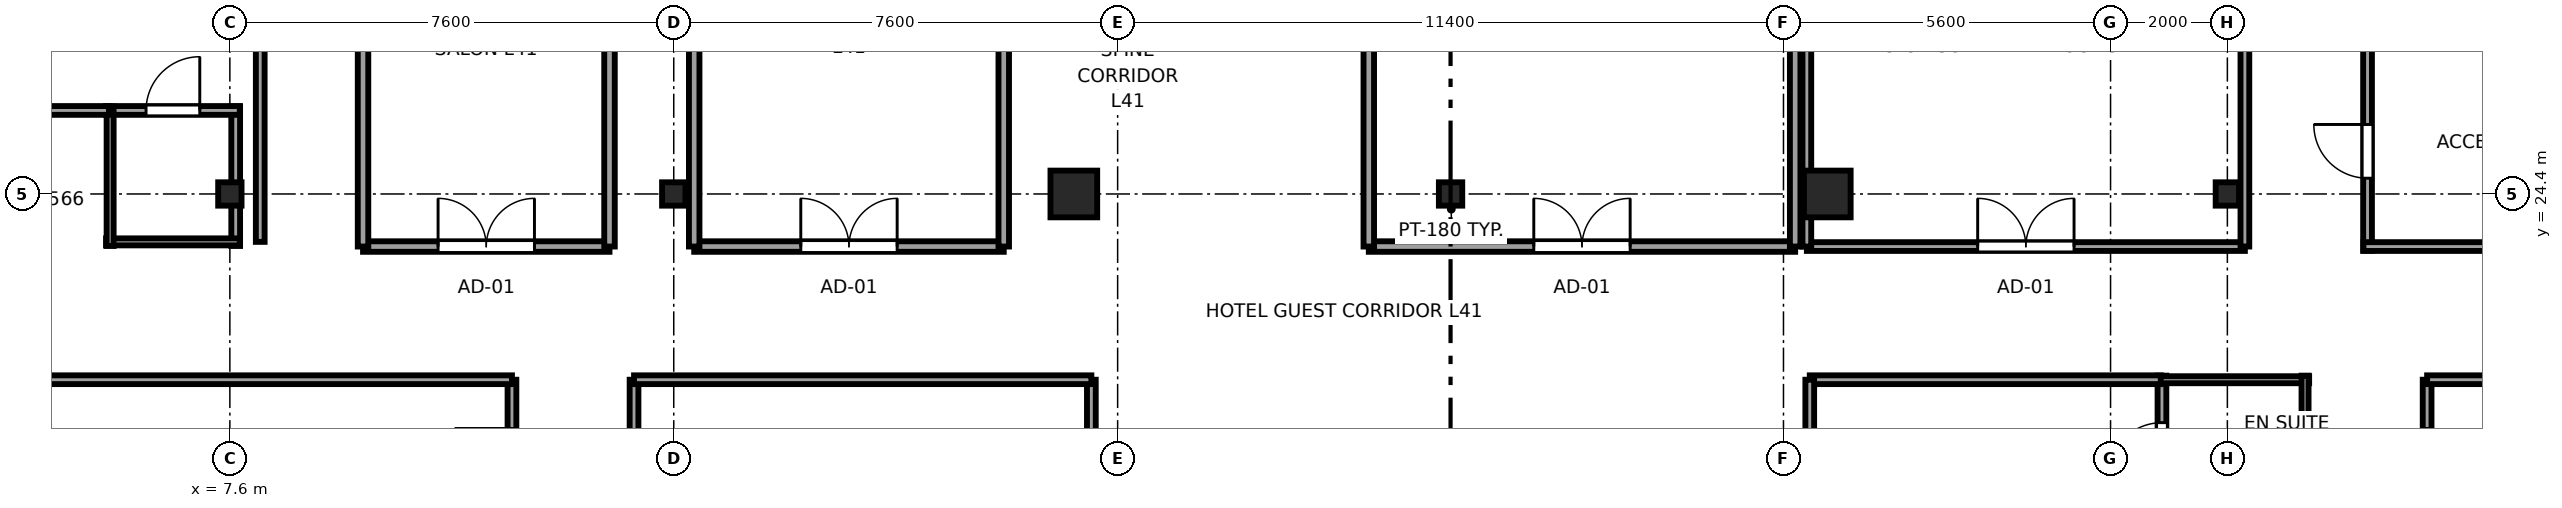
"""IFC4 building model, lengths in metres.
Left out: names, types, materials, properties, quantities, classifications, styles, units other than length and angle.
Written with IfcOpenShell. Run it as: python <this file> out.ifc"""

import sys

from ifc_helpers import new_model, si_unit, direction, frame, frame_2d, origin, origin_2d, place, context, subcontext, project, spatial, rectangle, i_section, extrude, source, transform, mapped, element, fill, save


model = new_model("IFC4")
c1 = context("Model", 3, precision=1e-05, world=origin(), true_north=direction((0.0, 1.0)))
c2 = subcontext(c1, "Body", "Model", "MODEL_VIEW")
j1 = project(units=[si_unit("LENGTHUNIT", "METRE"), si_unit("PLANEANGLEUNIT", "RADIAN")], contexts=[c1])
p1 = place(None, origin())
s1 = spatial("IfcSite", under=j1, at=p1, CompositionType="ELEMENT")
p2 = place(p1, origin())
s2 = spatial("IfcBuilding", under=s1, at=p2, CompositionType="ELEMENT")
p3 = place(p2, frame((0.0, 0.0, 157.7)))
s3 = spatial("IfcBuildingStorey", under=s2, at=p3, CompositionType="ELEMENT", Elevation=157.7)
m1 = source(origin(), c2, "Body", "SweptSolid", [
    extrude(i_section(OverallWidth=0.4, OverallDepth=0.4, WebThickness=0.02, FlangeThickness=0.035, at=origin_2d()), origin(), (0.0, 0.0, 1.0), 3.55),
])
for number, where, z_axis, x_axis in (
    (1, (7.6, 24.4, 0.0), (0.0, 0.0, 1.0), (1.0, 0.0, 0.0)),
    (2, (15.2, 24.4, 0.0), (0.0, 0.0, 1.0), (1.0, 0.0, 0.0)),
):
    element("IfcColumn", number, at=place(p3, frame(where, z_axis=z_axis, x_axis=x_axis)), inside=s3, PredefinedType="COLUMN", context=c2, shape_type="MappedRepresentation", body=[
        mapped(m1, transform((0.0, 0.0, 0.0), x_axis=(1.0, 0.0, 0.0), y_axis=(0.0, 1.0, 0.0), z_axis=(0.0, 0.0, 1.0), scale=1.0)),
    ])
m2 = source(origin(), c2, "Body", "SweptSolid", [
    extrude(rectangle(XDim=0.8, YDim=0.8, at=origin_2d()), origin(), (0.0, 0.0, 1.0), 3.55),
])
for number, where, z_axis, x_axis in (
    (3, (22.05, 24.4, 0.0), (0.0, 0.0, 1.0), (1.0, 0.0, 0.0)),
    (4, (34.95, 24.4, 0.0), (0.0, 0.0, 1.0), (1.0, 0.0, 0.0)),
):
    element("IfcColumn", number, at=place(p3, frame(where, z_axis=z_axis, x_axis=x_axis)), inside=s3, PredefinedType="COLUMN", context=c2, shape_type="MappedRepresentation", body=[
        mapped(m2, transform((0.0, 0.0, 0.0), x_axis=(1.0, 0.0, 0.0), y_axis=(0.0, 1.0, 0.0), z_axis=(0.0, 0.0, 1.0), scale=1.0)),
    ])
for number, where, z_axis, x_axis in (
    (5, (41.8, 24.4, 0.0), (0.0, 0.0, 1.0), (1.0, 0.0, 0.0)),
    (6, (28.5, 24.4, 0.0), (0.0, 0.0, 1.0), (1.0, 0.0, 0.0)),
):
    element("IfcColumn", number, at=place(p3, frame(where, z_axis=z_axis, x_axis=x_axis)), inside=s3, PredefinedType="COLUMN", context=c2, shape_type="MappedRepresentation", body=[
        mapped(m1, transform((0.0, 0.0, 0.0), x_axis=(1.0, 0.0, 0.0), y_axis=(0.0, 1.0, 0.0), z_axis=(0.0, 0.0, 1.0), scale=1.0)),
    ])
p4 = place(p3, frame((40.68, 18.9, 0.0), z_axis=(0.0, 0.0, 1.0), x_axis=(0.0, 1.0, 0.0)))
e7 = element("IfcWall", 7, at=p4, inside=s3, PredefinedType="PARTITIONING", context=c2, shape_type="SweptSolid", body=[
    extrude(rectangle(XDim=2.39, YDim=0.15, at=frame_2d((1.195, 0.0))), origin(), (0.0, 0.0, 1.0), 3.37),
])
p5 = place(p4, frame((0.665, 0.0, 0.0)))
e8 = element("IfcOpeningElement", 8, at=p5, cuts=e7, PredefinedType="OPENING", context=c2, shape_type="SweptSolid", body=[
    extrude(rectangle(XDim=0.92, YDim=2.01, at=frame_2d((0.46, 1.005))), frame((0.0, 0.085, 0.0), z_axis=(0.0, -1.0, 0.0), x_axis=(1.0, 0.0, 0.0)), (0.0, 0.0, 1.0), 0.17),
])
p6 = place(p3, frame((40.61, 21.22, 0.0), z_axis=(0.0, 0.0, 1.0), x_axis=(1.0, 0.0, 0.0)))
e9 = element("IfcWall", 9, at=p6, inside=s3, PredefinedType="PLUMBINGWALL", context=c2, shape_type="SweptSolid", body=[
    extrude(rectangle(XDim=2.59, YDim=0.12, at=frame_2d((1.295, 0.0))), origin(), (0.0, 0.0, 1.0), 3.37),
])
p7 = place(p3, frame((43.13, 18.9, 0.0), z_axis=(0.0, 0.0, 1.0), x_axis=(0.0, 1.0, 0.0)))
e10 = element("IfcWall", 10, at=p7, inside=s3, PredefinedType="PLUMBINGWALL", context=c2, shape_type="SweptSolid", body=[
    extrude(rectangle(XDim=2.39, YDim=0.12, at=frame_2d((1.195, 0.0))), origin(), (0.0, 0.0, 1.0), 3.37),
])
p8 = place(p3, frame((7.7, 23.51, 0.0), z_axis=(0.0, 0.0, 1.0), x_axis=(0.0, 1.0, 0.0)))
e11 = element("IfcWall", 11, at=p8, inside=s3, PredefinedType="PARTITIONING", context=c2, shape_type="SweptSolid", body=[
    extrude(rectangle(XDim=2.39, YDim=0.15, at=frame_2d((1.195, 0.0))), origin(), (0.0, 0.0, 1.0), 2.16),
])
p9 = place(p3, frame((5.48, 23.58, 0.0), z_axis=(0.0, 0.0, 1.0), x_axis=(1.0, 0.0, 0.0)))
e12 = element("IfcWall", 12, at=p9, inside=s3, PredefinedType="PLUMBINGWALL", context=c2, shape_type="SweptSolid", body=[
    extrude(rectangle(XDim=2.29, YDim=0.12, at=frame_2d((1.145, 0.0))), origin(), (0.0, 0.0, 1.0), 3.37),
])
p10 = place(p3, frame((5.48, 25.83, 0.0), z_axis=(0.0, 0.0, 1.0), x_axis=(1.0, 0.0, 0.0)))
e13 = element("IfcWall", 13, at=p10, inside=s3, PredefinedType="PARTITIONING", context=c2, shape_type="SweptSolid", body=[
    extrude(rectangle(XDim=2.29, YDim=0.15, at=frame_2d((1.145, 0.0))), origin(), (0.0, 0.0, 1.0), 3.37),
])
p11 = place(p10, frame((0.685, 0.0, 0.0)))
e14 = element("IfcOpeningElement", 14, at=p11, cuts=e13, PredefinedType="OPENING", context=c2, shape_type="SweptSolid", body=[
    extrude(rectangle(XDim=0.92, YDim=2.01, at=frame_2d((0.46, 1.005))), frame((0.0, 0.085, 0.0), z_axis=(0.0, -1.0, 0.0), x_axis=(1.0, 0.0, 0.0)), (0.0, 0.0, 1.0), 0.17),
])
p12 = place(p3, frame((5.55, 23.51, 0.0), z_axis=(0.0, 0.0, 1.0), x_axis=(0.0, 1.0, 0.0)))
e15 = element("IfcWall", 15, at=p12, inside=s3, PredefinedType="PLUMBINGWALL", context=c2, shape_type="SweptSolid", body=[
    extrude(rectangle(XDim=2.39, YDim=0.12, at=frame_2d((1.195, 0.0))), origin(), (0.0, 0.0, 1.0), 3.37),
])
p13 = place(p3, frame((12.43, 18.61, 0.0), z_axis=(0.0, 0.0, 1.0), x_axis=(0.0, 1.0, 0.0)))
e16 = element("IfcWall", 16, at=p13, inside=s3, PredefinedType="PARTITIONING", context=c2, shape_type="SweptSolid", body=[
    extrude(rectangle(XDim=2.61, YDim=0.15, at=frame_2d((1.305, 0.0))), origin(), (0.0, 0.0, 1.0), 3.37),
])
p14 = place(p13, frame((0.795, 0.0, 0.0)))
e17 = element("IfcOpeningElement", 17, at=p14, cuts=e16, PredefinedType="OPENING", context=c2, shape_type="SweptSolid", body=[
    extrude(rectangle(XDim=0.98, YDim=2.12, at=frame_2d((0.49, 1.06))), frame((0.0, 0.085, 0.0), z_axis=(0.0, -1.0, 0.0), x_axis=(1.0, 0.0, 0.0)), (0.0, 0.0, 1.0), 0.17),
])
p15 = place(p3, frame((2.9, 21.22, 0.0), z_axis=(0.0, 0.0, 1.0), x_axis=(1.0, 0.0, 0.0)))
e18 = element("IfcWall", 18, at=p15, inside=s3, PredefinedType="PARTITIONING", context=c2, shape_type="SweptSolid", body=[
    extrude(rectangle(XDim=9.53, YDim=0.15, at=frame_2d((4.765, 0.0))), origin(), (0.0, 0.0, 1.0), 3.37),
])
p16 = place(p3, frame((14.52, 14.61, 0.0), z_axis=(0.0, 0.0, 1.0), x_axis=(0.0, 1.0, 0.0)))
e19 = element("IfcWall", 19, at=p16, inside=s3, PredefinedType="PARTITIONING", context=c2, shape_type="SweptSolid", body=[
    extrude(rectangle(XDim=6.61, YDim=0.15, at=frame_2d((3.305, 0.0))), origin(), (0.0, 0.0, 1.0), 3.37),
])
p17 = place(p16, frame((2.795, 0.0, 0.0)))
e20 = element("IfcOpeningElement", 20, at=p17, cuts=e19, PredefinedType="OPENING", context=c2, shape_type="SweptSolid", body=[
    extrude(rectangle(XDim=0.98, YDim=2.12, at=frame_2d((0.49, 1.06))), frame((0.0, 0.085, 0.0), z_axis=(0.0, -1.0, 0.0), x_axis=(1.0, 0.0, 0.0)), (0.0, 0.0, 1.0), 0.17),
])
p18 = place(p3, frame((22.35, 12.28, 0.0), z_axis=(0.0, 0.0, 1.0), x_axis=(0.0, 1.0, 0.0)))
e21 = element("IfcWall", 21, at=p18, inside=s3, PredefinedType="PARTITIONING", context=c2, shape_type="SweptSolid", body=[
    extrude(rectangle(XDim=8.94, YDim=0.15, at=frame_2d((4.47, 0.0))), origin(), (0.0, 0.0, 1.0), 3.37),
])
p19 = place(p3, frame((14.52, 21.22, 0.0), z_axis=(0.0, 0.0, 1.0), x_axis=(1.0, 0.0, 0.0)))
e22 = element("IfcWall", 22, at=p19, inside=s3, PredefinedType="PARTITIONING", context=c2, shape_type="SweptSolid", body=[
    extrude(rectangle(XDim=7.83, YDim=0.15, at=frame_2d((3.915, 0.0))), origin(), (0.0, 0.0, 1.0), 3.37),
])
p20 = place(p3, frame((34.65, 21.22, 0.0), z_axis=(0.0, 0.0, 1.0), x_axis=(1.0, 0.0, 0.0)))
e23 = element("IfcWall", 23, at=p20, inside=s3, PredefinedType="PARTITIONING", context=c2, shape_type="SweptSolid", body=[
    extrude(rectangle(XDim=6.01, YDim=0.15, at=frame_2d((3.005, 0.0))), origin(), (0.0, 0.0, 1.0), 3.37),
])
p21 = place(p3, frame((34.65, 15.28, 0.0), z_axis=(0.0, 0.0, 1.0), x_axis=(0.0, 1.0, 0.0)))
e24 = element("IfcWall", 24, at=p21, inside=s3, PredefinedType="PARTITIONING", context=c2, shape_type="SweptSolid", body=[
    extrude(rectangle(XDim=5.94, YDim=0.15, at=frame_2d((2.97, 0.0))), origin(), (0.0, 0.0, 1.0), 3.37),
])
p22 = place(p3, frame((45.22, 18.61, 0.0), z_axis=(0.0, 0.0, 1.0), x_axis=(0.0, 1.0, 0.0)))
e25 = element("IfcWall", 25, at=p22, inside=s3, PredefinedType="PARTITIONING", context=c2, shape_type="SweptSolid", body=[
    extrude(rectangle(XDim=2.61, YDim=0.15, at=frame_2d((1.305, 0.0))), origin(), (0.0, 0.0, 1.0), 3.37),
])
p23 = place(p22, frame((0.795, 0.0, 0.0)))
e26 = element("IfcOpeningElement", 26, at=p23, cuts=e25, PredefinedType="OPENING", context=c2, shape_type="SweptSolid", body=[
    extrude(rectangle(XDim=0.98, YDim=2.12, at=frame_2d((0.49, 1.06))), frame((0.0, 0.085, 0.0), z_axis=(0.0, -1.0, 0.0), x_axis=(1.0, 0.0, 0.0)), (0.0, 0.0, 1.0), 0.17),
])
p24 = place(p3, frame((45.22, 21.22, 0.0), z_axis=(0.0, 0.0, 1.0), x_axis=(1.0, 0.0, 0.0)))
e27 = element("IfcWall", 27, at=p24, inside=s3, PredefinedType="PARTITIONING", context=c2, shape_type="SweptSolid", body=[
    extrude(rectangle(XDim=8.775, YDim=0.15, at=frame_2d((4.388, 0.0))), origin(), (0.0, 0.0, 1.0), 3.37),
])
p25 = place(p3, frame((8.12, 23.58, 0.0), z_axis=(0.0, 0.0, 1.0), x_axis=(0.0, 1.0, 0.0)))
e28 = element("IfcWall", 28, at=p25, inside=s3, PredefinedType="PARTITIONING", context=c2, shape_type="SweptSolid", body=[
    extrude(rectangle(XDim=10.74, YDim=0.15, at=frame_2d((5.37, 0.0))), origin(), (0.0, 0.0, 1.0), 3.37),
])
p26 = place(p25, frame((4.88, 0.0, 0.0)))
e29 = element("IfcOpeningElement", 29, at=p26, cuts=e28, PredefinedType="OPENING", context=c2, shape_type="SweptSolid", body=[
    extrude(rectangle(XDim=0.98, YDim=2.12, at=frame_2d((0.49, 1.06))), frame((0.0, 0.085, 0.0), z_axis=(0.0, -1.0, 0.0), x_axis=(1.0, 0.0, 0.0)), (0.0, 0.0, 1.0), 0.17),
])
p27 = place(p3, frame((2.9, 25.83, 0.0), z_axis=(0.0, 0.0, 1.0), x_axis=(1.0, 0.0, 0.0)))
e30 = element("IfcWall", 30, at=p27, inside=s3, PredefinedType="PARTITIONING", context=c2, shape_type="SweptSolid", body=[
    extrude(rectangle(XDim=2.63, YDim=0.15, at=frame_2d((1.315, 0.0))), origin(), (0.0, 0.0, 1.0), 3.37),
])
p28 = place(p3, frame((44.2, 23.43, 0.0), z_axis=(0.0, 0.0, 1.0), x_axis=(0.0, 1.0, 0.0)))
e31 = element("IfcWall", 31, at=p28, inside=s3, PredefinedType="PARTITIONING", context=c2, shape_type="SweptSolid", body=[
    extrude(rectangle(XDim=3.74, YDim=0.15, at=frame_2d((1.87, 0.0))), origin(), (0.0, 0.0, 1.0), 3.37),
])
p29 = place(p28, frame((1.24, 0.0, 0.0)))
e32 = element("IfcOpeningElement", 32, at=p29, cuts=e31, PredefinedType="OPENING", context=c2, shape_type="SweptSolid", body=[
    extrude(rectangle(XDim=0.92, YDim=2.01, at=frame_2d((0.46, 1.005))), frame((0.0, 0.085, 0.0), z_axis=(0.0, -1.0, 0.0), x_axis=(1.0, 0.0, 0.0)), (0.0, 0.0, 1.0), 0.17),
])
p30 = place(p3, frame((44.13, 23.5, 0.0), z_axis=(0.0, 0.0, 1.0), x_axis=(1.0, 0.0, 0.0)))
e33 = element("IfcWall", 33, at=p30, inside=s3, PredefinedType="PARTITIONING", context=c2, shape_type="SweptSolid", body=[
    extrude(rectangle(XDim=4.54, YDim=0.15, at=frame_2d((2.27, 0.0))), origin(), (0.0, 0.0, 1.0), 3.37),
])
p31 = place(p3, frame((9.88, 23.5, 0.0), z_axis=(0.0, 0.0, 1.0), x_axis=(1.0, 0.0, 0.0)))
e34 = element("IfcWall", 34, at=p31, inside=s3, PredefinedType="PARTITIONING", context=c2, shape_type="SweptSolid", body=[
    extrude(rectangle(XDim=4.22, YDim=0.18, at=frame_2d((2.11, 0.0))), origin(), (0.0, 0.0, 1.0), 3.37),
])
p32 = place(p31, frame((1.285, 0.0, 0.0)))
e35 = element("IfcOpeningElement", 35, at=p32, cuts=e34, PredefinedType="OPENING", context=c2, shape_type="SweptSolid", body=[
    extrude(rectangle(XDim=1.65, YDim=2.15, at=frame_2d((0.825, 1.075))), frame((0.0, 0.1, 0.0), z_axis=(0.0, -1.0, 0.0), x_axis=(1.0, 0.0, 0.0)), (0.0, 0.0, 1.0), 0.2),
])
for number, where, z_axis, x_axis in (
    (36, (9.88, 23.5, 0.0), (0.0, 0.0, 1.0), (0.0, 1.0, 0.0)),
    (37, (14.1, 23.5, 0.0), (0.0, 0.0, 1.0), (0.0, 1.0, 0.0)),
):
    element("IfcWall", number, at=place(p3, frame(where, z_axis=z_axis, x_axis=x_axis)), inside=s3, PredefinedType="PARTITIONING", context=c2, shape_type="SweptSolid", body=[
        extrude(rectangle(XDim=6.25, YDim=0.18, at=frame_2d((3.125, 0.0))), origin(), (0.0, 0.0, 1.0), 3.37),
    ])
p33 = place(p3, frame((27.1, 23.5, 0.0), z_axis=(0.0, 0.0, 1.0), x_axis=(1.0, 0.0, 0.0)))
e38 = element("IfcWall", 38, at=p33, inside=s3, PredefinedType="PARTITIONING", context=c2, shape_type="SweptSolid", body=[
    extrude(rectangle(XDim=7.3, YDim=0.18, at=frame_2d((3.65, 0.0))), origin(), (0.0, 0.0, 1.0), 3.37),
])
p34 = place(p33, frame((2.825, 0.0, 0.0)))
e39 = element("IfcOpeningElement", 39, at=p34, cuts=e38, PredefinedType="OPENING", context=c2, shape_type="SweptSolid", body=[
    extrude(rectangle(XDim=1.65, YDim=2.15, at=frame_2d((0.825, 1.075))), frame((0.0, 0.1, 0.0), z_axis=(0.0, -1.0, 0.0), x_axis=(1.0, 0.0, 0.0)), (0.0, 0.0, 1.0), 0.2),
])
for number, where, z_axis, x_axis in (
    (40, (27.1, 23.5, 0.0), (0.0, 0.0, 1.0), (0.0, 1.0, 0.0)),
    (41, (34.4, 23.5, 0.0), (0.0, 0.0, 1.0), (0.0, 1.0, 0.0)),
):
    element("IfcWall", number, at=place(p3, frame(where, z_axis=z_axis, x_axis=x_axis)), inside=s3, PredefinedType="PARTITIONING", context=c2, shape_type="SweptSolid", body=[
        extrude(rectangle(XDim=6.3, YDim=0.18, at=frame_2d((3.15, 0.0))), origin(), (0.0, 0.0, 1.0), 3.37),
    ])
p35 = place(p3, frame((15.55, 23.5, 0.0), z_axis=(0.0, 0.0, 1.0), x_axis=(1.0, 0.0, 0.0)))
e42 = element("IfcWall", 42, at=p35, inside=s3, PredefinedType="PARTITIONING", context=c2, shape_type="SweptSolid", body=[
    extrude(rectangle(XDim=5.3, YDim=0.18, at=frame_2d((2.65, 0.0))), origin(), (0.0, 0.0, 1.0), 3.37),
])
p36 = place(p35, frame((1.825, 0.0, 0.0)))
e43 = element("IfcOpeningElement", 43, at=p36, cuts=e42, PredefinedType="OPENING", context=c2, shape_type="SweptSolid", body=[
    extrude(rectangle(XDim=1.65, YDim=2.15, at=frame_2d((0.825, 1.075))), frame((0.0, 0.1, 0.0), z_axis=(0.0, -1.0, 0.0), x_axis=(1.0, 0.0, 0.0)), (0.0, 0.0, 1.0), 0.2),
])
for number, where, z_axis, x_axis in (
    (44, (15.55, 23.5, 0.0), (0.0, 0.0, 1.0), (0.0, 1.0, 0.0)),
    (45, (20.85, 23.5, 0.0), (0.0, 0.0, 1.0), (0.0, 1.0, 0.0)),
):
    element("IfcWall", number, at=place(p3, frame(where, z_axis=z_axis, x_axis=x_axis)), inside=s3, PredefinedType="PARTITIONING", context=c2, shape_type="SweptSolid", body=[
        extrude(rectangle(XDim=6.3, YDim=0.18, at=frame_2d((3.15, 0.0))), origin(), (0.0, 0.0, 1.0), 3.37),
    ])
p37 = place(p3, frame((34.6, 23.5, 0.0), z_axis=(0.0, 0.0, 1.0), x_axis=(1.0, 0.0, 0.0)))
e46 = element("IfcWall", 46, at=p37, inside=s3, PredefinedType="PARTITIONING", context=c2, shape_type="SweptSolid", body=[
    extrude(rectangle(XDim=7.5, YDim=0.15, at=frame_2d((3.75, 0.0))), origin(), (0.0, 0.0, 1.0), 3.37),
])
p38 = place(p37, frame((2.925, 0.0, 0.0)))
e47 = element("IfcOpeningElement", 47, at=p38, cuts=e46, PredefinedType="OPENING", context=c2, shape_type="SweptSolid", body=[
    extrude(rectangle(XDim=1.65, YDim=2.15, at=frame_2d((0.825, 1.075))), frame((0.0, 0.085, 0.0), z_axis=(0.0, -1.0, 0.0), x_axis=(1.0, 0.0, 0.0)), (0.0, 0.0, 1.0), 0.17),
])
p39 = place(p3, frame((34.6, 23.5, 0.0), z_axis=(0.0, 0.0, 1.0), x_axis=(0.0, 1.0, 0.0)))
e48 = element("IfcWall", 48, at=p39, inside=s3, PredefinedType="PARTITIONING", context=c2, shape_type="SweptSolid", body=[
    extrude(rectangle(XDim=5.9, YDim=0.15, at=frame_2d((2.95, 0.0))), origin(), (0.0, 0.0, 1.0), 3.37),
])
p40 = place(p3, frame((42.1, 23.5, 0.0), z_axis=(0.0, 0.0, 1.0), x_axis=(0.0, 1.0, 0.0)))
e49 = element("IfcWall", 49, at=p40, inside=s3, PredefinedType="PARTITIONING", context=c2, shape_type="SweptSolid", body=[
    extrude(rectangle(XDim=5.9, YDim=0.15, at=frame_2d((2.95, 0.0))), origin(), (0.0, 0.0, 1.0), 2.16),
])
m3 = source(origin(), c2, "Body", "SweptSolid", [
    extrude(rectangle(XDim=0.92, YDim=2.01, at=frame_2d((0.46, 1.005))), frame((0.0, 0.025, 0.0), z_axis=(0.0, -1.0, 0.0), x_axis=(1.0, 0.0, 0.0)), (0.0, 0.0, 1.0), 0.05),
])
p41 = place(p5, origin())
e50 = element("IfcDoor", 50, at=p41, inside=s3, OperationType="SINGLE_SWING_LEFT", PredefinedType="DOOR", context=c2, shape_type="MappedRepresentation", body=[
    mapped(m3, transform((0.0, 0.0, 0.0), x_axis=(1.0, 0.0, 0.0), y_axis=(0.0, 1.0, 0.0), z_axis=(0.0, 0.0, 1.0), scale=1.0)),
])
fill(e8, e50)
p42 = place(p11, origin())
e51 = element("IfcDoor", 51, at=p42, inside=s3, OperationType="SINGLE_SWING_RIGHT", PredefinedType="DOOR", context=c2, shape_type="MappedRepresentation", body=[
    mapped(m3, transform((0.0, 0.0, 0.0), x_axis=(1.0, 0.0, 0.0), y_axis=(0.0, 1.0, 0.0), z_axis=(0.0, 0.0, 1.0), scale=1.0)),
])
fill(e14, e51)
p43 = place(p29, origin())
e52 = element("IfcDoor", 52, at=p43, inside=s3, OperationType="SINGLE_SWING_RIGHT", PredefinedType="DOOR", context=c2, shape_type="MappedRepresentation", body=[
    mapped(m3, transform((0.0, 0.0, 0.0), x_axis=(1.0, 0.0, 0.0), y_axis=(0.0, 1.0, 0.0), z_axis=(0.0, 0.0, 1.0), scale=1.0)),
])
fill(e32, e52)
m4 = source(origin(), c2, "Body", "SweptSolid", [
    extrude(rectangle(XDim=1.65, YDim=2.15, at=frame_2d((0.825, 1.075))), frame((0.0, 0.025, 0.0), z_axis=(0.0, -1.0, 0.0), x_axis=(1.0, 0.0, 0.0)), (0.0, 0.0, 1.0), 0.05),
])
p44 = place(p32, origin())
e53 = element("IfcDoor", 53, at=p44, inside=s3, OperationType="DOUBLE_DOOR_SINGLE_SWING", PredefinedType="DOOR", context=c2, shape_type="MappedRepresentation", body=[
    mapped(m4, transform((0.0, 0.0, 0.0), x_axis=(1.0, 0.0, 0.0), y_axis=(0.0, 1.0, 0.0), z_axis=(0.0, 0.0, 1.0), scale=1.0)),
])
fill(e35, e53)
p45 = place(p34, origin())
e54 = element("IfcDoor", 54, at=p45, inside=s3, OperationType="DOUBLE_DOOR_SINGLE_SWING", PredefinedType="DOOR", context=c2, shape_type="MappedRepresentation", body=[
    mapped(m4, transform((0.0, 0.0, 0.0), x_axis=(1.0, 0.0, 0.0), y_axis=(0.0, 1.0, 0.0), z_axis=(0.0, 0.0, 1.0), scale=1.0)),
])
fill(e39, e54)
p46 = place(p36, origin())
e55 = element("IfcDoor", 55, at=p46, inside=s3, OperationType="DOUBLE_DOOR_SINGLE_SWING", PredefinedType="DOOR", context=c2, shape_type="MappedRepresentation", body=[
    mapped(m4, transform((0.0, 0.0, 0.0), x_axis=(1.0, 0.0, 0.0), y_axis=(0.0, 1.0, 0.0), z_axis=(0.0, 0.0, 1.0), scale=1.0)),
])
fill(e43, e55)
p47 = place(p38, origin())
e56 = element("IfcDoor", 56, at=p47, inside=s3, OperationType="DOUBLE_DOOR_SINGLE_SWING", PredefinedType="DOOR", context=c2, shape_type="MappedRepresentation", body=[
    mapped(m4, transform((0.0, 0.0, 0.0), x_axis=(1.0, 0.0, 0.0), y_axis=(0.0, 1.0, 0.0), z_axis=(0.0, 0.0, 1.0), scale=1.0)),
])
fill(e47, e56)
save(model, sys.argv[1])
